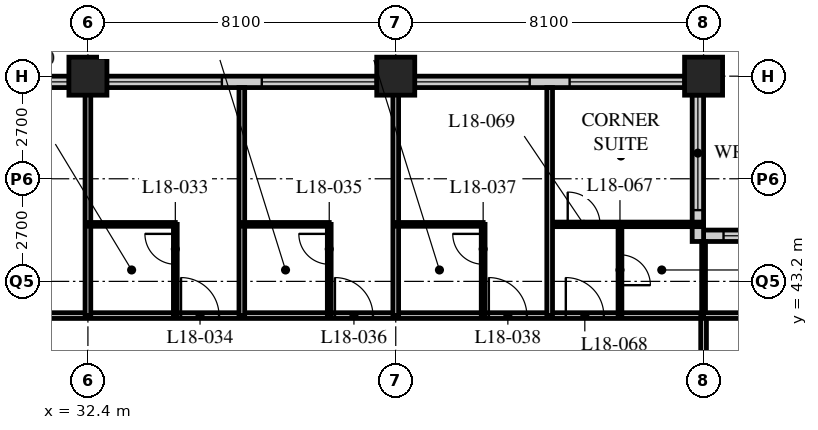
"""IFC4 building model, lengths in metres.
Left out: names, types, materials, properties, quantities, classifications, styles, units other than length and angle.
Written with IfcOpenShell. Run it as: python <this file> out.ifc"""

import sys

from ifc_helpers import new_model, si_unit, direction, frame, frame_2d, origin, origin_2d, place, context, subcontext, project, spatial, rectangle, hollow_rectangle, extrude, element, fill, save


model = new_model("IFC4")
c1 = context("Model", 3, precision=1e-05, world=origin(), true_north=direction((0.0, 1.0)))
c2 = subcontext(c1, "Body", "Model", "MODEL_VIEW")
j1 = project(units=[si_unit("LENGTHUNIT", "METRE"), si_unit("PLANEANGLEUNIT", "RADIAN")], contexts=[c1])
p1 = place(None, origin())
s1 = spatial("IfcSite", under=j1, at=p1, CompositionType="ELEMENT")
p2 = place(p1, origin())
s2 = spatial("IfcBuilding", under=s1, at=p2, CompositionType="ELEMENT")
p3 = place(p2, frame((0.0, 0.0, 73.8)))
s3 = spatial("IfcBuildingStorey", under=s2, at=p3, CompositionType="ELEMENT", Elevation=73.8)
for number, where, z_axis, x_axis in (
    (1, (32.4, 48.6, 0.0), (0.0, 0.0, 1.0), (1.0, 0.0, 0.0)),
    (2, (40.5, 48.6, 0.0), (0.0, 0.0, 1.0), (1.0, 0.0, 0.0)),
    (3, (48.6, 48.6, 0.0), (0.0, 0.0, 1.0), (1.0, 0.0, 0.0)),
):
    element("IfcColumn", number, at=place(p3, frame(where, z_axis=z_axis, x_axis=x_axis)), inside=s3, PredefinedType="COLUMN", context=c2, shape_type="SweptSolid", body=[
        extrude(hollow_rectangle(XDim=1.0, YDim=1.0, WallThickness=0.1, at=origin_2d()), origin(), (0.0, 0.0, 1.0), 3.4),
    ])
p4 = place(p3, frame((52.35, 44.4, 0.0), z_axis=(0.0, 0.0, 1.0), x_axis=(-1.0, 0.0, 0.0)))
e4 = element("IfcWall", 4, at=p4, inside=s3, PredefinedType="SOLIDWALL", context=c2, shape_type="SweptSolid", body=[
    extrude(rectangle(XDim=3.75, YDim=0.3, at=frame_2d((1.875, 0.0))), origin(), (0.0, 0.0, 1.0), 3.19),
])
p5 = place(p4, frame((0.225, 0.0, 0.9)))
e5 = element("IfcOpeningElement", 5, at=p5, cuts=e4, PredefinedType="OPENING", context=c2, shape_type="SweptSolid", body=[
    extrude(rectangle(XDim=3.0, YDim=1.5, at=frame_2d((1.5, 0.75))), frame((0.0, 0.16, 0.0), z_axis=(0.0, -1.0, 0.0), x_axis=(1.0, 0.0, 0.0)), (0.0, 0.0, 1.0), 0.32),
])
p6 = place(p3, frame((48.45, 44.25, 0.0), z_axis=(0.0, 0.0, 1.0), x_axis=(0.0, 1.0, 0.0)))
e6 = element("IfcWall", 6, at=p6, inside=s3, PredefinedType="SOLIDWALL", context=c2, shape_type="SweptSolid", body=[
    extrude(rectangle(XDim=4.35, YDim=0.3, at=frame_2d((2.175, 0.0))), origin(), (0.0, 0.0, 1.0), 3.19),
])
p7 = place(p6, frame((0.825, 0.0, 0.9)))
e7 = element("IfcOpeningElement", 7, at=p7, cuts=e6, PredefinedType="OPENING", context=c2, shape_type="SweptSolid", body=[
    extrude(rectangle(XDim=3.0, YDim=1.5, at=frame_2d((1.5, 0.75))), frame((0.0, 0.16, 0.0), z_axis=(0.0, -1.0, 0.0), x_axis=(1.0, 0.0, 0.0)), (0.0, 0.0, 1.0), 0.32),
])
p8 = place(p3, frame((48.3, 48.45, 0.0), z_axis=(0.0, 0.0, 1.0), x_axis=(-1.0, 0.0, 0.0)))
e8 = element("IfcWall", 8, at=p8, inside=s3, PredefinedType="SOLIDWALL", context=c2, shape_type="SweptSolid", body=[
    extrude(rectangle(XDim=40.2, YDim=0.3, at=frame_2d((20.1, 0.0))), origin(), (0.0, 0.0, 1.0), 3.19),
])
p9 = place(p8, frame((0.225, 0.0, 0.9)))
e9 = element("IfcOpeningElement", 9, at=p9, cuts=e8, PredefinedType="OPENING", context=c2, shape_type="SweptSolid", body=[
    extrude(rectangle(XDim=3.0, YDim=2.0, at=frame_2d((1.5, 1.0))), frame((0.0, 0.16, 0.0), z_axis=(0.0, -1.0, 0.0), x_axis=(1.0, 0.0, 0.0)), (0.0, 0.0, 1.0), 0.32),
])
p10 = place(p8, frame((4.275, 0.0, 0.9)))
e10 = element("IfcOpeningElement", 10, at=p10, cuts=e8, PredefinedType="OPENING", context=c2, shape_type="SweptSolid", body=[
    extrude(rectangle(XDim=3.0, YDim=2.0, at=frame_2d((1.5, 1.0))), frame((0.0, 0.16, 0.0), z_axis=(0.0, -1.0, 0.0), x_axis=(1.0, 0.0, 0.0)), (0.0, 0.0, 1.0), 0.32),
])
p11 = place(p8, frame((8.325, 0.0, 0.9)))
e11 = element("IfcOpeningElement", 11, at=p11, cuts=e8, PredefinedType="OPENING", context=c2, shape_type="SweptSolid", body=[
    extrude(rectangle(XDim=3.0, YDim=2.0, at=frame_2d((1.5, 1.0))), frame((0.0, 0.16, 0.0), z_axis=(0.0, -1.0, 0.0), x_axis=(1.0, 0.0, 0.0)), (0.0, 0.0, 1.0), 0.32),
])
p12 = place(p8, frame((12.375, 0.0, 0.9)))
e12 = element("IfcOpeningElement", 12, at=p12, cuts=e8, PredefinedType="OPENING", context=c2, shape_type="SweptSolid", body=[
    extrude(rectangle(XDim=3.0, YDim=2.0, at=frame_2d((1.5, 1.0))), frame((0.0, 0.16, 0.0), z_axis=(0.0, -1.0, 0.0), x_axis=(1.0, 0.0, 0.0)), (0.0, 0.0, 1.0), 0.32),
])
p13 = place(p8, frame((16.425, 0.0, 0.9)))
e13 = element("IfcOpeningElement", 13, at=p13, cuts=e8, PredefinedType="OPENING", context=c2, shape_type="SweptSolid", body=[
    extrude(rectangle(XDim=3.0, YDim=2.0, at=frame_2d((1.5, 1.0))), frame((0.0, 0.16, 0.0), z_axis=(0.0, -1.0, 0.0), x_axis=(1.0, 0.0, 0.0)), (0.0, 0.0, 1.0), 0.32),
])
p14 = place(p8, frame((20.475, 0.0, 0.9)))
e14 = element("IfcOpeningElement", 14, at=p14, cuts=e8, PredefinedType="OPENING", context=c2, shape_type="SweptSolid", body=[
    extrude(rectangle(XDim=3.0, YDim=2.0, at=frame_2d((1.5, 1.0))), frame((0.0, 0.16, 0.0), z_axis=(0.0, -1.0, 0.0), x_axis=(1.0, 0.0, 0.0)), (0.0, 0.0, 1.0), 0.32),
])
p15 = place(p8, frame((24.525, 0.0, 0.9)))
e15 = element("IfcOpeningElement", 15, at=p15, cuts=e8, PredefinedType="OPENING", context=c2, shape_type="SweptSolid", body=[
    extrude(rectangle(XDim=3.0, YDim=2.0, at=frame_2d((1.5, 1.0))), frame((0.0, 0.16, 0.0), z_axis=(0.0, -1.0, 0.0), x_axis=(1.0, 0.0, 0.0)), (0.0, 0.0, 1.0), 0.32),
])
p16 = place(p8, frame((28.575, 0.0, 0.9)))
e16 = element("IfcOpeningElement", 16, at=p16, cuts=e8, PredefinedType="OPENING", context=c2, shape_type="SweptSolid", body=[
    extrude(rectangle(XDim=3.0, YDim=2.0, at=frame_2d((1.5, 1.0))), frame((0.0, 0.16, 0.0), z_axis=(0.0, -1.0, 0.0), x_axis=(1.0, 0.0, 0.0)), (0.0, 0.0, 1.0), 0.32),
])
p17 = place(p8, frame((32.625, 0.0, 0.9)))
e17 = element("IfcOpeningElement", 17, at=p17, cuts=e8, PredefinedType="OPENING", context=c2, shape_type="SweptSolid", body=[
    extrude(rectangle(XDim=3.0, YDim=2.0, at=frame_2d((1.5, 1.0))), frame((0.0, 0.16, 0.0), z_axis=(0.0, -1.0, 0.0), x_axis=(1.0, 0.0, 0.0)), (0.0, 0.0, 1.0), 0.32),
])
p18 = place(p8, frame((36.675, 0.0, 0.9)))
e18 = element("IfcOpeningElement", 18, at=p18, cuts=e8, PredefinedType="OPENING", context=c2, shape_type="SweptSolid", body=[
    extrude(rectangle(XDim=3.0, YDim=2.0, at=frame_2d((1.5, 1.0))), frame((0.0, 0.16, 0.0), z_axis=(0.0, -1.0, 0.0), x_axis=(1.0, 0.0, 0.0)), (0.0, 0.0, 1.0), 0.32),
])
p19 = place(p3, frame((12.15, 42.3, 0.0), z_axis=(0.0, 0.0, 1.0), x_axis=(1.0, 0.0, 0.0)))
e19 = element("IfcWall", 19, at=p19, inside=s3, PredefinedType="PARTITIONING", context=c2, shape_type="SweptSolid", body=[
    extrude(rectangle(XDim=36.45, YDim=0.15, at=frame_2d((18.225, 0.0))), origin(), (0.0, 0.0, 1.0), 3.19),
])
p20 = place(p19, frame((9.5, 0.0, 0.0)))
e20 = element("IfcOpeningElement", 20, at=p20, cuts=e19, PredefinedType="OPENING", context=c2, shape_type="SweptSolid", body=[
    extrude(rectangle(XDim=1.0, YDim=2.1, at=frame_2d((0.5, 1.05))), frame((0.0, 0.085, 0.0), z_axis=(0.0, -1.0, 0.0), x_axis=(1.0, 0.0, 0.0)), (0.0, 0.0, 1.0), 0.17),
])
p21 = place(p19, frame((17.6, 0.0, 0.0)))
e21 = element("IfcOpeningElement", 21, at=p21, cuts=e19, PredefinedType="OPENING", context=c2, shape_type="SweptSolid", body=[
    extrude(rectangle(XDim=1.0, YDim=2.1, at=frame_2d((0.5, 1.05))), frame((0.0, 0.085, 0.0), z_axis=(0.0, -1.0, 0.0), x_axis=(1.0, 0.0, 0.0)), (0.0, 0.0, 1.0), 0.17),
])
p22 = place(p19, frame((22.7, 0.0, 0.0)))
e22 = element("IfcOpeningElement", 22, at=p22, cuts=e19, PredefinedType="OPENING", context=c2, shape_type="SweptSolid", body=[
    extrude(rectangle(XDim=1.0, YDim=2.1, at=frame_2d((0.5, 1.05))), frame((0.0, 0.085, 0.0), z_axis=(0.0, -1.0, 0.0), x_axis=(1.0, 0.0, 0.0)), (0.0, 0.0, 1.0), 0.17),
])
p23 = place(p19, frame((26.75, 0.0, 0.0)))
e23 = element("IfcOpeningElement", 23, at=p23, cuts=e19, PredefinedType="OPENING", context=c2, shape_type="SweptSolid", body=[
    extrude(rectangle(XDim=1.0, YDim=2.1, at=frame_2d((0.5, 1.05))), frame((0.0, 0.085, 0.0), z_axis=(0.0, -1.0, 0.0), x_axis=(1.0, 0.0, 0.0)), (0.0, 0.0, 1.0), 0.17),
])
p24 = place(p19, frame((30.8, 0.0, 0.0)))
e24 = element("IfcOpeningElement", 24, at=p24, cuts=e19, PredefinedType="OPENING", context=c2, shape_type="SweptSolid", body=[
    extrude(rectangle(XDim=1.0, YDim=2.1, at=frame_2d((0.5, 1.05))), frame((0.0, 0.085, 0.0), z_axis=(0.0, -1.0, 0.0), x_axis=(1.0, 0.0, 0.0)), (0.0, 0.0, 1.0), 0.17),
])
p25 = place(p19, frame((32.825, 0.0, 0.0)))
e25 = element("IfcOpeningElement", 25, at=p25, cuts=e19, PredefinedType="OPENING", context=c2, shape_type="SweptSolid", body=[
    extrude(rectangle(XDim=1.0, YDim=2.1, at=frame_2d((0.5, 1.05))), frame((0.0, 0.085, 0.0), z_axis=(0.0, -1.0, 0.0), x_axis=(1.0, 0.0, 0.0)), (0.0, 0.0, 1.0), 0.17),
])
p26 = place(p19, frame((2.625, 0.0, 0.0)))
e26 = element("IfcOpeningElement", 26, at=p26, cuts=e19, PredefinedType="OPENING", context=c2, shape_type="SweptSolid", body=[
    extrude(rectangle(XDim=1.0, YDim=2.1, at=frame_2d((0.5, 1.05))), frame((0.0, 0.085, 0.0), z_axis=(0.0, -1.0, 0.0), x_axis=(1.0, 0.0, 0.0)), (0.0, 0.0, 1.0), 0.17),
])
p27 = place(p3, frame((48.6, 16.2, 0.0), z_axis=(0.0, 0.0, 1.0), x_axis=(0.0, 1.0, 0.0)))
e27 = element("IfcWall", 27, at=p27, inside=s3, PredefinedType="PARTITIONING", context=c2, shape_type="SweptSolid", body=[
    extrude(rectangle(XDim=26.1, YDim=0.15, at=frame_2d((13.05, 0.0))), origin(), (0.0, 0.0, 1.0), 2.578),
])
p28 = place(p27, frame((2.75, 0.0, 0.0)))
e28 = element("IfcOpeningElement", 28, at=p28, cuts=e27, PredefinedType="OPENING", context=c2, shape_type="SweptSolid", body=[
    extrude(rectangle(XDim=1.0, YDim=2.1, at=frame_2d((0.5, 1.05))), frame((0.0, 0.085, 0.0), z_axis=(0.0, -1.0, 0.0), x_axis=(1.0, 0.0, 0.0)), (0.0, 0.0, 1.0), 0.17),
])
p29 = place(p27, frame((4.65, 0.0, 0.0)))
e29 = element("IfcOpeningElement", 29, at=p29, cuts=e27, PredefinedType="OPENING", context=c2, shape_type="SweptSolid", body=[
    extrude(rectangle(XDim=1.0, YDim=2.1, at=frame_2d((0.5, 1.05))), frame((0.0, 0.085, 0.0), z_axis=(0.0, -1.0, 0.0), x_axis=(1.0, 0.0, 0.0)), (0.0, 0.0, 1.0), 0.17),
])
p30 = place(p27, frame((13.55, 0.0, 0.0)))
e30 = element("IfcOpeningElement", 30, at=p30, cuts=e27, PredefinedType="OPENING", context=c2, shape_type="SweptSolid", body=[
    extrude(rectangle(XDim=1.0, YDim=2.1, at=frame_2d((0.5, 1.05))), frame((0.0, 0.085, 0.0), z_axis=(0.0, -1.0, 0.0), x_axis=(1.0, 0.0, 0.0)), (0.0, 0.0, 1.0), 0.17),
])
p31 = place(p27, frame((21.65, 0.0, 0.0)))
e31 = element("IfcOpeningElement", 31, at=p31, cuts=e27, PredefinedType="OPENING", context=c2, shape_type="SweptSolid", body=[
    extrude(rectangle(XDim=1.0, YDim=2.1, at=frame_2d((0.5, 1.05))), frame((0.0, 0.085, 0.0), z_axis=(0.0, -1.0, 0.0), x_axis=(1.0, 0.0, 0.0)), (0.0, 0.0, 1.0), 0.17),
])
p32 = place(p3, frame((32.4, 42.3, 0.0), z_axis=(0.0, 0.0, 1.0), x_axis=(0.0, 1.0, 0.0)))
e32 = element("IfcWall", 32, at=p32, inside=s3, PredefinedType="PARTITIONING", context=c2, shape_type="SweptSolid", body=[
    extrude(rectangle(XDim=6.0, YDim=0.15, at=frame_2d((3.0, 0.0))), origin(), (0.0, 0.0, 1.0), 2.578),
])
p33 = place(p3, frame((32.4, 44.7, 0.0), z_axis=(0.0, 0.0, 1.0), x_axis=(1.0, 0.0, 0.0)))
e33 = element("IfcWall", 33, at=p33, inside=s3, PredefinedType="PARTITIONING", context=c2, shape_type="SweptSolid", body=[
    extrude(rectangle(XDim=2.3, YDim=0.1, at=frame_2d((1.15, 0.0))), origin(), (0.0, 0.0, 1.0), 3.19),
])
p34 = place(p3, frame((34.7, 42.3, 0.0), z_axis=(0.0, 0.0, 1.0), x_axis=(0.0, 1.0, 0.0)))
e34 = element("IfcWall", 34, at=p34, inside=s3, PredefinedType="PARTITIONING", context=c2, shape_type="SweptSolid", body=[
    extrude(rectangle(XDim=2.4, YDim=0.1, at=frame_2d((1.2, 0.0))), origin(), (0.0, 0.0, 1.0), 3.19),
])
p35 = place(p34, frame((1.35, 0.0, 0.0)))
e35 = element("IfcOpeningElement", 35, at=p35, cuts=e34, PredefinedType="OPENING", context=c2, shape_type="SweptSolid", body=[
    extrude(rectangle(XDim=0.8, YDim=2.1, at=frame_2d((0.4, 1.05))), frame((0.0, 0.06, 0.0), z_axis=(0.0, -1.0, 0.0), x_axis=(1.0, 0.0, 0.0)), (0.0, 0.0, 1.0), 0.12),
])
p36 = place(p3, frame((36.45, 42.3, 0.0), z_axis=(0.0, 0.0, 1.0), x_axis=(0.0, 1.0, 0.0)))
e36 = element("IfcWall", 36, at=p36, inside=s3, PredefinedType="PARTITIONING", context=c2, shape_type="SweptSolid", body=[
    extrude(rectangle(XDim=6.0, YDim=0.15, at=frame_2d((3.0, 0.0))), origin(), (0.0, 0.0, 1.0), 3.19),
])
p37 = place(p3, frame((36.45, 44.7, 0.0), z_axis=(0.0, 0.0, 1.0), x_axis=(1.0, 0.0, 0.0)))
e37 = element("IfcWall", 37, at=p37, inside=s3, PredefinedType="PARTITIONING", context=c2, shape_type="SweptSolid", body=[
    extrude(rectangle(XDim=2.3, YDim=0.1, at=frame_2d((1.15, 0.0))), origin(), (0.0, 0.0, 1.0), 3.19),
])
p38 = place(p3, frame((38.75, 42.3, 0.0), z_axis=(0.0, 0.0, 1.0), x_axis=(0.0, 1.0, 0.0)))
e38 = element("IfcWall", 38, at=p38, inside=s3, PredefinedType="PARTITIONING", context=c2, shape_type="SweptSolid", body=[
    extrude(rectangle(XDim=2.4, YDim=0.1, at=frame_2d((1.2, 0.0))), origin(), (0.0, 0.0, 1.0), 3.19),
])
p39 = place(p38, frame((1.35, 0.0, 0.0)))
e39 = element("IfcOpeningElement", 39, at=p39, cuts=e38, PredefinedType="OPENING", context=c2, shape_type="SweptSolid", body=[
    extrude(rectangle(XDim=0.8, YDim=2.1, at=frame_2d((0.4, 1.05))), frame((0.0, 0.06, 0.0), z_axis=(0.0, -1.0, 0.0), x_axis=(1.0, 0.0, 0.0)), (0.0, 0.0, 1.0), 0.12),
])
p40 = place(p3, frame((40.5, 42.3, 0.0), z_axis=(0.0, 0.0, 1.0), x_axis=(0.0, 1.0, 0.0)))
e40 = element("IfcWall", 40, at=p40, inside=s3, PredefinedType="PARTITIONING", context=c2, shape_type="SweptSolid", body=[
    extrude(rectangle(XDim=6.0, YDim=0.15, at=frame_2d((3.0, 0.0))), origin(), (0.0, 0.0, 1.0), 2.578),
])
p41 = place(p3, frame((40.5, 44.7, 0.0), z_axis=(0.0, 0.0, 1.0), x_axis=(1.0, 0.0, 0.0)))
e41 = element("IfcWall", 41, at=p41, inside=s3, PredefinedType="PARTITIONING", context=c2, shape_type="SweptSolid", body=[
    extrude(rectangle(XDim=2.3, YDim=0.1, at=frame_2d((1.15, 0.0))), origin(), (0.0, 0.0, 1.0), 3.19),
])
p42 = place(p3, frame((42.8, 42.3, 0.0), z_axis=(0.0, 0.0, 1.0), x_axis=(0.0, 1.0, 0.0)))
e42 = element("IfcWall", 42, at=p42, inside=s3, PredefinedType="PARTITIONING", context=c2, shape_type="SweptSolid", body=[
    extrude(rectangle(XDim=2.4, YDim=0.1, at=frame_2d((1.2, 0.0))), origin(), (0.0, 0.0, 1.0), 3.19),
])
p43 = place(p42, frame((1.35, 0.0, 0.0)))
e43 = element("IfcOpeningElement", 43, at=p43, cuts=e42, PredefinedType="OPENING", context=c2, shape_type="SweptSolid", body=[
    extrude(rectangle(XDim=0.8, YDim=2.1, at=frame_2d((0.4, 1.05))), frame((0.0, 0.06, 0.0), z_axis=(0.0, -1.0, 0.0), x_axis=(1.0, 0.0, 0.0)), (0.0, 0.0, 1.0), 0.12),
])
p44 = place(p3, frame((44.55, 44.7, 0.0), z_axis=(0.0, 0.0, 1.0), x_axis=(1.0, 0.0, 0.0)))
e44 = element("IfcWall", 44, at=p44, inside=s3, PredefinedType="PARTITIONING", context=c2, shape_type="SweptSolid", body=[
    extrude(rectangle(XDim=4.05, YDim=0.12, at=frame_2d((2.025, 0.0))), origin(), (0.0, 0.0, 1.0), 3.19),
])
p45 = place(p44, frame((0.475, 0.0, 0.0)))
e45 = element("IfcOpeningElement", 45, at=p45, cuts=e44, PredefinedType="OPENING", context=c2, shape_type="SweptSolid", body=[
    extrude(rectangle(XDim=0.85, YDim=2.1, at=frame_2d((0.425, 1.05))), frame((0.0, 0.07, 0.0), z_axis=(0.0, -1.0, 0.0), x_axis=(1.0, 0.0, 0.0)), (0.0, 0.0, 1.0), 0.14),
])
p46 = place(p3, frame((46.4, 42.3, 0.0), z_axis=(0.0, 0.0, 1.0), x_axis=(0.0, 1.0, 0.0)))
e46 = element("IfcWall", 46, at=p46, inside=s3, PredefinedType="PARTITIONING", context=c2, shape_type="SweptSolid", body=[
    extrude(rectangle(XDim=2.4, YDim=0.1, at=frame_2d((1.2, 0.0))), origin(), (0.0, 0.0, 1.0), 3.19),
])
p47 = place(p46, frame((0.8, 0.0, 0.0)))
e47 = element("IfcOpeningElement", 47, at=p47, cuts=e46, PredefinedType="OPENING", context=c2, shape_type="SweptSolid", body=[
    extrude(rectangle(XDim=0.8, YDim=2.1, at=frame_2d((0.4, 1.05))), frame((0.0, 0.06, 0.0), z_axis=(0.0, -1.0, 0.0), x_axis=(1.0, 0.0, 0.0)), (0.0, 0.0, 1.0), 0.12),
])
p48 = place(p3, frame((48.6, 42.3, 0.0), z_axis=(0.0, 0.0, 1.0), x_axis=(0.0, 1.0, 0.0)))
e48 = element("IfcWall", 48, at=p48, inside=s3, PredefinedType="PARTITIONING", context=c2, shape_type="SweptSolid", body=[
    extrude(rectangle(XDim=1.95, YDim=0.1, at=frame_2d((0.975, 0.0))), origin(), (0.0, 0.0, 1.0), 2.578),
])
p49 = place(p3, frame((48.6, 42.3, 0.0), z_axis=(0.0, 0.0, 1.0), x_axis=(1.0, 0.0, 0.0)))
e49 = element("IfcWall", 49, at=p49, inside=s3, PredefinedType="PARTITIONING", context=c2, shape_type="SweptSolid", body=[
    extrude(rectangle(XDim=3.75, YDim=0.15, at=frame_2d((1.875, 0.0))), origin(), (0.0, 0.0, 1.0), 3.19),
])
p50 = place(p3, frame((44.55, 42.3, 0.0), z_axis=(0.0, 0.0, 1.0), x_axis=(0.0, 1.0, 0.0)))
e50 = element("IfcWall", 50, at=p50, inside=s3, PredefinedType="PARTITIONING", context=c2, shape_type="SweptSolid", body=[
    extrude(rectangle(XDim=6.0, YDim=0.15, at=frame_2d((3.0, 0.0))), origin(), (0.0, 0.0, 1.0), 3.19),
])
p51 = place(p5, origin())
e51 = element("IfcWindow", 51, at=p51, inside=s3, PartitioningType="SINGLE_PANEL", PredefinedType="WINDOW", context=c2, shape_type="SweptSolid", body=[
    extrude(rectangle(XDim=3.0, YDim=1.5, at=frame_2d((1.5, 0.75))), frame((0.0, 0.03, 0.0), z_axis=(0.0, -1.0, 0.0), x_axis=(1.0, 0.0, 0.0)), (0.0, 0.0, 1.0), 0.06),
])
fill(e5, e51)
p52 = place(p7, origin())
e52 = element("IfcWindow", 52, at=p52, inside=s3, PartitioningType="SINGLE_PANEL", PredefinedType="WINDOW", context=c2, shape_type="SweptSolid", body=[
    extrude(rectangle(XDim=3.0, YDim=1.5, at=frame_2d((1.5, 0.75))), frame((0.0, 0.03, 0.0), z_axis=(0.0, -1.0, 0.0), x_axis=(1.0, 0.0, 0.0)), (0.0, 0.0, 1.0), 0.06),
])
fill(e7, e52)
p53 = place(p9, origin())
e53 = element("IfcWindow", 53, at=p53, inside=s3, PartitioningType="SINGLE_PANEL", PredefinedType="WINDOW", context=c2, shape_type="SweptSolid", body=[
    extrude(rectangle(XDim=3.0, YDim=2.0, at=frame_2d((1.5, 1.0))), frame((0.0, 0.03, 0.0), z_axis=(0.0, -1.0, 0.0), x_axis=(1.0, 0.0, 0.0)), (0.0, 0.0, 1.0), 0.06),
])
fill(e9, e53)
p54 = place(p10, origin())
e54 = element("IfcWindow", 54, at=p54, inside=s3, PartitioningType="SINGLE_PANEL", PredefinedType="WINDOW", context=c2, shape_type="SweptSolid", body=[
    extrude(rectangle(XDim=3.0, YDim=2.0, at=frame_2d((1.5, 1.0))), frame((0.0, 0.03, 0.0), z_axis=(0.0, -1.0, 0.0), x_axis=(1.0, 0.0, 0.0)), (0.0, 0.0, 1.0), 0.06),
])
fill(e10, e54)
p55 = place(p11, origin())
e55 = element("IfcWindow", 55, at=p55, inside=s3, PartitioningType="SINGLE_PANEL", PredefinedType="WINDOW", context=c2, shape_type="SweptSolid", body=[
    extrude(rectangle(XDim=3.0, YDim=2.0, at=frame_2d((1.5, 1.0))), frame((0.0, 0.03, 0.0), z_axis=(0.0, -1.0, 0.0), x_axis=(1.0, 0.0, 0.0)), (0.0, 0.0, 1.0), 0.06),
])
fill(e11, e55)
p56 = place(p12, origin())
e56 = element("IfcWindow", 56, at=p56, inside=s3, PartitioningType="SINGLE_PANEL", PredefinedType="WINDOW", context=c2, shape_type="SweptSolid", body=[
    extrude(rectangle(XDim=3.0, YDim=2.0, at=frame_2d((1.5, 1.0))), frame((0.0, 0.03, 0.0), z_axis=(0.0, -1.0, 0.0), x_axis=(1.0, 0.0, 0.0)), (0.0, 0.0, 1.0), 0.06),
])
fill(e12, e56)
p57 = place(p13, origin())
e57 = element("IfcWindow", 57, at=p57, inside=s3, PartitioningType="SINGLE_PANEL", PredefinedType="WINDOW", context=c2, shape_type="SweptSolid", body=[
    extrude(rectangle(XDim=3.0, YDim=2.0, at=frame_2d((1.5, 1.0))), frame((0.0, 0.03, 0.0), z_axis=(0.0, -1.0, 0.0), x_axis=(1.0, 0.0, 0.0)), (0.0, 0.0, 1.0), 0.06),
])
fill(e13, e57)
p58 = place(p35, origin())
e58 = element("IfcDoor", 58, at=p58, inside=s3, OperationType="SINGLE_SWING_RIGHT", PredefinedType="DOOR", context=c2, shape_type="SweptSolid", body=[
    extrude(rectangle(XDim=0.8, YDim=2.1, at=frame_2d((0.4, 1.05))), frame((0.0, 0.025, 0.0), z_axis=(0.0, -1.0, 0.0), x_axis=(1.0, 0.0, 0.0)), (0.0, 0.0, 1.0), 0.05),
])
fill(e35, e58)
p59 = place(p22, origin())
e59 = element("IfcDoor", 59, at=p59, inside=s3, OperationType="SINGLE_SWING_LEFT", PredefinedType="DOOR", context=c2, shape_type="SweptSolid", body=[
    extrude(rectangle(XDim=1.0, YDim=2.1, at=frame_2d((0.5, 1.05))), frame((0.0, 0.025, 0.0), z_axis=(0.0, -1.0, 0.0), x_axis=(1.0, 0.0, 0.0)), (0.0, 0.0, 1.0), 0.05),
])
fill(e22, e59)
p60 = place(p39, origin())
e60 = element("IfcDoor", 60, at=p60, inside=s3, OperationType="SINGLE_SWING_RIGHT", PredefinedType="DOOR", context=c2, shape_type="SweptSolid", body=[
    extrude(rectangle(XDim=0.8, YDim=2.1, at=frame_2d((0.4, 1.05))), frame((0.0, 0.025, 0.0), z_axis=(0.0, -1.0, 0.0), x_axis=(1.0, 0.0, 0.0)), (0.0, 0.0, 1.0), 0.05),
])
fill(e39, e60)
p61 = place(p23, origin())
e61 = element("IfcDoor", 61, at=p61, inside=s3, OperationType="SINGLE_SWING_LEFT", PredefinedType="DOOR", context=c2, shape_type="SweptSolid", body=[
    extrude(rectangle(XDim=1.0, YDim=2.1, at=frame_2d((0.5, 1.05))), frame((0.0, 0.025, 0.0), z_axis=(0.0, -1.0, 0.0), x_axis=(1.0, 0.0, 0.0)), (0.0, 0.0, 1.0), 0.05),
])
fill(e23, e61)
p62 = place(p43, origin())
e62 = element("IfcDoor", 62, at=p62, inside=s3, OperationType="SINGLE_SWING_RIGHT", PredefinedType="DOOR", context=c2, shape_type="SweptSolid", body=[
    extrude(rectangle(XDim=0.8, YDim=2.1, at=frame_2d((0.4, 1.05))), frame((0.0, 0.025, 0.0), z_axis=(0.0, -1.0, 0.0), x_axis=(1.0, 0.0, 0.0)), (0.0, 0.0, 1.0), 0.05),
])
fill(e43, e62)
p63 = place(p24, origin())
e63 = element("IfcDoor", 63, at=p63, inside=s3, OperationType="SINGLE_SWING_LEFT", PredefinedType="DOOR", context=c2, shape_type="SweptSolid", body=[
    extrude(rectangle(XDim=1.0, YDim=2.1, at=frame_2d((0.5, 1.05))), frame((0.0, 0.025, 0.0), z_axis=(0.0, -1.0, 0.0), x_axis=(1.0, 0.0, 0.0)), (0.0, 0.0, 1.0), 0.05),
])
fill(e24, e63)
p64 = place(p47, origin())
e64 = element("IfcDoor", 64, at=p64, inside=s3, OperationType="SINGLE_SWING_RIGHT", PredefinedType="DOOR", context=c2, shape_type="SweptSolid", body=[
    extrude(rectangle(XDim=0.8, YDim=2.1, at=frame_2d((0.4, 1.05))), frame((0.0, 0.025, 0.0), z_axis=(0.0, -1.0, 0.0), x_axis=(1.0, 0.0, 0.0)), (0.0, 0.0, 1.0), 0.05),
])
fill(e47, e64)
p65 = place(p25, origin())
e65 = element("IfcDoor", 65, at=p65, inside=s3, OperationType="SINGLE_SWING_LEFT", PredefinedType="DOOR", context=c2, shape_type="SweptSolid", body=[
    extrude(rectangle(XDim=1.0, YDim=2.1, at=frame_2d((0.5, 1.05))), frame((0.0, 0.025, 0.0), z_axis=(0.0, -1.0, 0.0), x_axis=(1.0, 0.0, 0.0)), (0.0, 0.0, 1.0), 0.05),
])
fill(e25, e65)
p66 = place(p45, origin())
e66 = element("IfcDoor", 66, at=p66, inside=s3, OperationType="SINGLE_SWING_LEFT", PredefinedType="DOOR", context=c2, shape_type="SweptSolid", body=[
    extrude(rectangle(XDim=0.85, YDim=2.1, at=frame_2d((0.425, 1.05))), frame((0.0, 0.025, 0.0), z_axis=(0.0, -1.0, 0.0), x_axis=(1.0, 0.0, 0.0)), (0.0, 0.0, 1.0), 0.05),
])
fill(e45, e66)
save(model, sys.argv[1])
